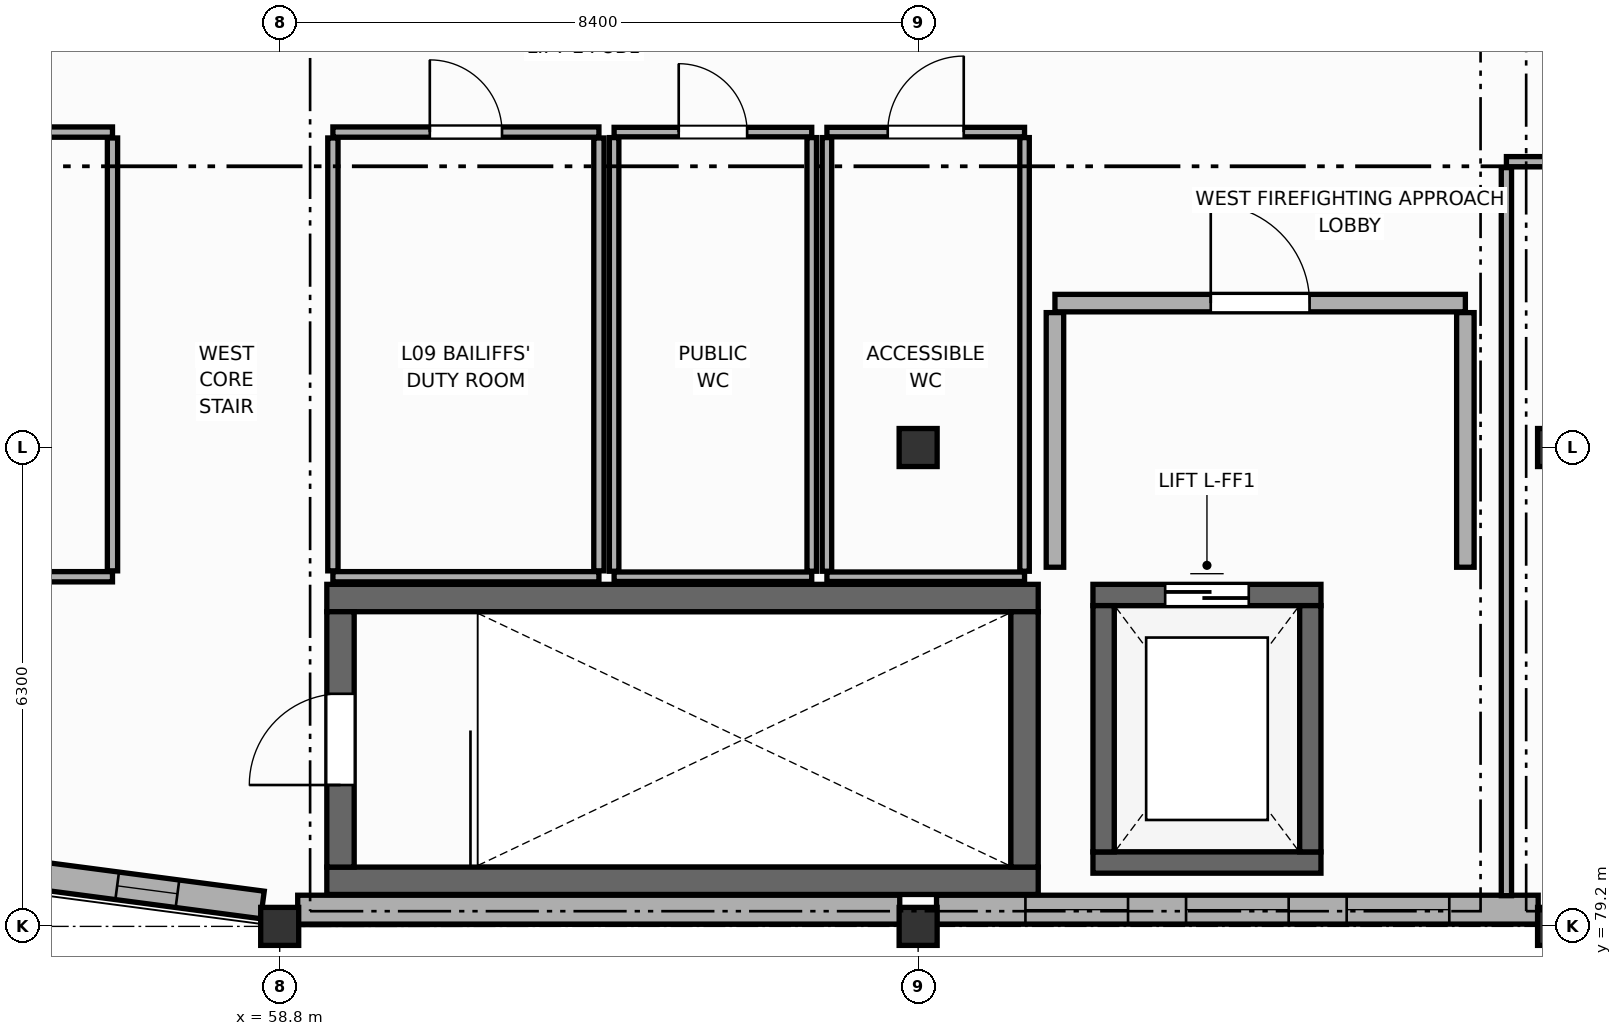
"""IFC4 building model, lengths in metres.
Left out: names, types, materials, properties, quantities, classifications, styles, units other than length and angle.
Written with IfcOpenShell. Run it as: python <this file> out.ifc"""

import sys

from ifc_helpers import new_model, si_unit, direction, frame, frame_2d, origin, origin_2d, place, context, subcontext, project, spatial, rectangle, extrude, element, fill, save


model = new_model("IFC4")
c1 = context("Model", 3, precision=1e-05, world=origin(), true_north=direction((0.0, 1.0)))
c2 = subcontext(c1, "Body", "Model", "MODEL_VIEW")
j1 = project(units=[si_unit("LENGTHUNIT", "METRE"), si_unit("PLANEANGLEUNIT", "RADIAN")], contexts=[c1])
p1 = place(None, origin())
s1 = spatial("IfcSite", under=j1, at=p1, CompositionType="ELEMENT")
p2 = place(p1, origin())
s2 = spatial("IfcBuilding", under=s1, at=p2, CompositionType="ELEMENT")
p3 = place(p2, frame((0.0, 0.0, 35.4)))
s3 = spatial("IfcBuildingStorey", under=s2, at=p3, CompositionType="ELEMENT", Elevation=35.4)
for number, where, z_axis, x_axis in (
    (1, (58.8, 79.2, 0.0), (0.0, 0.0, 1.0), (1.0, 0.0, 0.0)),
    (2, (67.2, 79.2, 0.0), (0.0, 0.0, 1.0), (1.0, 0.0, 0.0)),
    (3, (67.2, 85.5, 0.0), (0.0, 0.0, 1.0), (1.0, 0.0, 0.0)),
    (4, (75.6, 79.2, 0.0), (0.0, 0.0, 1.0), (1.0, 0.0, 0.0)),
    (5, (75.6, 85.5, 0.0), (0.0, 0.0, 1.0), (1.0, 0.0, 0.0)),
):
    element("IfcColumn", number, at=place(p3, frame(where, z_axis=z_axis, x_axis=x_axis)), inside=s3, PredefinedType="COLUMN", context=c2, shape_type="SweptSolid", body=[
        extrude(rectangle(XDim=0.5, YDim=0.5, at=origin_2d()), origin(), (0.0, 0.0, 1.0), 4.2),
    ])
p4 = place(p3, frame((66.958, 79.42, 0.0), z_axis=(0.0, 0.0, 1.0), x_axis=(-1.0, 0.0, 0.0)))
e6 = element("IfcWall", 6, at=p4, inside=s3, PredefinedType="STANDARD", context=c2, shape_type="SweptSolid", body=[
    extrude(rectangle(XDim=7.921, YDim=0.38, at=frame_2d((3.96, 0.0))), origin(), (0.0, 0.0, 1.0), 3.095),
])
p5 = place(p3, frame((75.358, 79.42, 0.0), z_axis=(0.0, 0.0, 1.0), x_axis=(-1.0, 0.0, 0.0)))
e7 = element("IfcWall", 7, at=p5, inside=s3, PredefinedType="STANDARD", context=c2, shape_type="SweptSolid", body=[
    extrude(rectangle(XDim=7.916, YDim=0.38, at=frame_2d((3.958, 0.0))), origin(), (0.0, 0.0, 1.0), 3.495),
])
p6 = place(p5, frame((1.17, 0.0, 0.85)))
e8 = element("IfcOpeningElement", 8, at=p6, cuts=e7, PredefinedType="OPENING", context=c2, shape_type="SweptSolid", body=[
    extrude(rectangle(XDim=1.35, YDim=1.95, at=frame_2d((0.675, 0.975))), frame((0.0, 0.2, 0.0), z_axis=(0.0, -1.0, 0.0), x_axis=(1.0, 0.0, 0.0)), (0.0, 0.0, 1.0), 0.4),
])
p7 = place(p5, frame((3.283, 0.0, 0.85)))
e9 = element("IfcOpeningElement", 9, at=p7, cuts=e7, PredefinedType="OPENING", context=c2, shape_type="SweptSolid", body=[
    extrude(rectangle(XDim=1.35, YDim=1.95, at=frame_2d((0.675, 0.975))), frame((0.0, 0.2, 0.0), z_axis=(0.0, -1.0, 0.0), x_axis=(1.0, 0.0, 0.0)), (0.0, 0.0, 1.0), 0.4),
])
p8 = place(p5, frame((5.396, 0.0, 0.85)))
e10 = element("IfcOpeningElement", 10, at=p8, cuts=e7, PredefinedType="OPENING", context=c2, shape_type="SweptSolid", body=[
    extrude(rectangle(XDim=1.35, YDim=1.95, at=frame_2d((0.675, 0.975))), frame((0.0, 0.2, 0.0), z_axis=(0.0, -1.0, 0.0), x_axis=(1.0, 0.0, 0.0)), (0.0, 0.0, 1.0), 0.4),
])
p9 = place(p3, frame((55.572, 79.877, 0.0), z_axis=(0.0, 0.0, 1.0), x_axis=(0.991438641413, -0.130573428817, 0.0)))
e11 = element("IfcWall", 11, at=p9, inside=s3, PredefinedType="ELEMENTEDWALL", context=c2, shape_type="SweptSolid", body=[
    extrude(rectangle(XDim=3.027, YDim=0.365, at=frame_2d((1.514, 0.0))), origin(), (0.0, 0.0, 1.0), 3.095),
])
p10 = place(p9, frame((1.1, 0.0, 0.85)))
e12 = element("IfcOpeningElement", 12, at=p10, cuts=e11, PredefinedType="OPENING", context=c2, shape_type="SweptSolid", body=[
    extrude(rectangle(XDim=0.8, YDim=1.7, at=frame_2d((0.4, 0.85))), frame((0.0, 0.192, 0.0), z_axis=(0.0, -1.0, 0.0), x_axis=(1.0, 0.0, 0.0)), (0.0, 0.0, 1.0), 0.385),
])
p11 = place(p3, frame((102.0, 79.35, 4.2), z_axis=(0.0, 0.0, 1.0), x_axis=(-1.0, 0.0, 0.0)))
e13 = element("IfcWall", 13, at=p11, inside=s3, PredefinedType="PARAPET", context=c2, shape_type="SweptSolid", body=[
    extrude(rectangle(XDim=43.2, YDim=0.245, at=frame_2d((21.6, 0.0))), origin(), (0.0, 0.0, 1.0), 1.15),
])
p12 = place(p3, frame((58.8, 79.7, 4.2), z_axis=(0.0, 0.0, 1.0), x_axis=(0.0, 1.0, 0.0)))
e14 = element("IfcWall", 14, at=p12, inside=s3, PredefinedType="PARAPET", context=c2, shape_type="SweptSolid", body=[
    extrude(rectangle(XDim=24.2, YDim=0.245, at=frame_2d((12.1, 0.0))), origin(), (0.0, 0.0, 1.0), 1.15),
])
for number, where, z_axis, x_axis in (
    (15, (59.42, 83.52, 0.0), (0.0, 0.0, 1.0), (1.0, 0.0, 0.0)),
    (16, (68.78, 79.8, 0.0), (0.0, 0.0, 1.0), (-1.0, 0.0, 0.0)),
):
    element("IfcWall", number, at=place(p3, frame(where, z_axis=z_axis, x_axis=x_axis)), inside=s3, PredefinedType="SHEAR", context=c2, shape_type="SweptSolid", body=[
        extrude(rectangle(XDim=9.36, YDim=0.36, at=frame_2d((4.68, 0.0))), origin(), (0.0, 0.0, 1.0), 3.98),
    ])
p13 = place(p3, frame((59.6, 79.98, 0.0), z_axis=(0.0, 0.0, 1.0), x_axis=(0.0, 1.0, 0.0)))
e17 = element("IfcWall", 17, at=p13, inside=s3, PredefinedType="SHEAR", context=c2, shape_type="SweptSolid", body=[
    extrude(rectangle(XDim=3.36, YDim=0.36, at=frame_2d((1.68, 0.0))), origin(), (0.0, 0.0, 1.0), 3.98),
])
p14 = place(p13, frame((1.08, 0.0, 0.0)))
e18 = element("IfcOpeningElement", 18, at=p14, cuts=e17, PredefinedType="OPENING", context=c2, shape_type="SweptSolid", body=[
    extrude(rectangle(XDim=1.2, YDim=2.2, at=frame_2d((0.6, 1.1))), frame((0.0, 0.19, 0.0), z_axis=(0.0, -1.0, 0.0), x_axis=(1.0, 0.0, 0.0)), (0.0, 0.0, 1.0), 0.38),
])
p15 = place(p3, frame((68.6, 83.34, 0.0), z_axis=(0.0, 0.0, 1.0), x_axis=(0.0, -1.0, 0.0)))
e19 = element("IfcWall", 19, at=p15, inside=s3, PredefinedType="SHEAR", context=c2, shape_type="SweptSolid", body=[
    extrude(rectangle(XDim=3.36, YDim=0.36, at=frame_2d((1.68, 0.0))), origin(), (0.0, 0.0, 1.0), 3.98),
])
p16 = place(p3, frame((69.5, 83.56, 0.0), z_axis=(0.0, 0.0, 1.0), x_axis=(1.0, 0.0, 0.0)))
e20 = element("IfcWall", 20, at=p16, inside=s3, PredefinedType="SHEAR", context=c2, shape_type="SweptSolid", body=[
    extrude(rectangle(XDim=3.0, YDim=0.28, at=frame_2d((1.5, 0.0))), origin(), (0.0, 0.0, 1.0), 3.98),
])
p17 = place(p16, frame((0.95, 0.0, 0.0)))
e21 = element("IfcOpeningElement", 21, at=p17, cuts=e20, PredefinedType="OPENING", context=c2, shape_type="SweptSolid", body=[
    extrude(rectangle(XDim=1.1, YDim=2.2, at=frame_2d((0.55, 1.1))), frame((0.0, 0.15, 0.0), z_axis=(0.0, -1.0, 0.0), x_axis=(1.0, 0.0, 0.0)), (0.0, 0.0, 1.0), 0.3),
])
p18 = place(p3, frame((72.5, 80.04, 0.0), z_axis=(0.0, 0.0, 1.0), x_axis=(-1.0, 0.0, 0.0)))
e22 = element("IfcWall", 22, at=p18, inside=s3, PredefinedType="SHEAR", context=c2, shape_type="SweptSolid", body=[
    extrude(rectangle(XDim=3.0, YDim=0.28, at=frame_2d((1.5, 0.0))), origin(), (0.0, 0.0, 1.0), 3.98),
])
for number, where, z_axis, x_axis in (
    (23, (69.64, 80.18, 0.0), (0.0, 0.0, 1.0), (0.0, 1.0, 0.0)),
    (24, (72.36, 83.42, 0.0), (0.0, 0.0, 1.0), (0.0, -1.0, 0.0)),
):
    element("IfcWall", number, at=place(p3, frame(where, z_axis=z_axis, x_axis=x_axis)), inside=s3, PredefinedType="SHEAR", context=c2, shape_type="SweptSolid", body=[
        extrude(rectangle(XDim=3.24, YDim=0.28, at=frame_2d((1.62, 0.0))), origin(), (0.0, 0.0, 1.0), 3.98),
    ])
p19 = place(p3, frame((69.0, 87.4, 0.0), z_axis=(0.0, 0.0, 1.0), x_axis=(1.0, 0.0, 0.0)))
e25 = element("IfcWall", 25, at=p19, inside=s3, PredefinedType="STANDARD", context=c2, shape_type="SweptSolid", body=[
    extrude(rectangle(XDim=5.4, YDim=0.23, at=frame_2d((2.7, 0.0))), origin(), (0.0, 0.0, 1.0), 3.95),
])
p20 = place(p19, frame((2.05, 0.0, 0.0)))
e26 = element("IfcOpeningElement", 26, at=p20, cuts=e25, PredefinedType="OPENING", context=c2, shape_type="SweptSolid", body=[
    extrude(rectangle(XDim=1.3, YDim=2.2, at=frame_2d((0.65, 1.1))), frame((0.0, 0.125, 0.0), z_axis=(0.0, -1.0, 0.0), x_axis=(1.0, 0.0, 0.0)), (0.0, 0.0, 1.0), 0.25),
])
for number, where, z_axis, x_axis in (
    (27, (69.0, 83.925, 0.0), (0.0, 0.0, 1.0), (0.0, 1.0, 0.0)),
    (28, (74.4, 87.275, 0.0), (0.0, 0.0, 1.0), (0.0, -1.0, 0.0)),
):
    element("IfcWall", number, at=place(p3, frame(where, z_axis=z_axis, x_axis=x_axis)), inside=s3, PredefinedType="STANDARD", context=c2, shape_type="SweptSolid", body=[
        extrude(rectangle(XDim=3.35, YDim=0.23, at=frame_2d((1.675, 0.0))), origin(), (0.0, 0.0, 1.0), 3.395),
    ])
p21 = place(p3, frame((63.2, 89.65, 0.0), z_axis=(0.0, 0.0, 1.0), x_axis=(1.0, 0.0, 0.0)))
e29 = element("IfcWall", 29, at=p21, inside=s3, PredefinedType="PARTITIONING", context=c2, shape_type="SweptSolid", body=[
    extrude(rectangle(XDim=2.6, YDim=0.125, at=frame_2d((1.3, 0.0))), origin(), (0.0, 0.0, 1.0), 3.95),
])
p22 = place(p21, frame((0.85, 0.0, 0.0)))
e30 = element("IfcOpeningElement", 30, at=p22, cuts=e29, PredefinedType="OPENING", context=c2, shape_type="SweptSolid", body=[
    extrude(rectangle(XDim=0.9, YDim=2.1, at=frame_2d((0.45, 1.05))), frame((0.0, 0.073, 0.0), z_axis=(0.0, -1.0, 0.0), x_axis=(1.0, 0.0, 0.0)), (0.0, 0.0, 1.0), 0.145),
])
p23 = place(p3, frame((65.8, 83.8, 0.0), z_axis=(0.0, 0.0, 1.0), x_axis=(-1.0, 0.0, 0.0)))
e31 = element("IfcWall", 31, at=p23, inside=s3, PredefinedType="PARTITIONING", context=c2, shape_type="SweptSolid", body=[
    extrude(rectangle(XDim=2.6, YDim=0.125, at=frame_2d((1.3, 0.0))), origin(), (0.0, 0.0, 1.0), 3.95),
])
for number, where, z_axis, x_axis in (
    (32, (63.2, 83.873, 0.0), (0.0, 0.0, 1.0), (0.0, 1.0, 0.0)),
    (33, (65.8, 89.577, 0.0), (0.0, 0.0, 1.0), (0.0, -1.0, 0.0)),
):
    element("IfcWall", number, at=place(p3, frame(where, z_axis=z_axis, x_axis=x_axis)), inside=s3, PredefinedType="PARTITIONING", context=c2, shape_type="SweptSolid", body=[
        extrude(rectangle(XDim=5.705, YDim=0.125, at=frame_2d((2.853, 0.0))), origin(), (0.0, 0.0, 1.0), 3.95),
    ])
p24 = place(p3, frame((66.0, 89.65, 0.0), z_axis=(0.0, 0.0, 1.0), x_axis=(1.0, 0.0, 0.0)))
e34 = element("IfcWall", 34, at=p24, inside=s3, PredefinedType="PARTITIONING", context=c2, shape_type="SweptSolid", body=[
    extrude(rectangle(XDim=2.6, YDim=0.125, at=frame_2d((1.3, 0.0))), origin(), (0.0, 0.0, 1.0), 3.495),
])
p25 = place(p24, frame((0.8, 0.0, 0.0)))
e35 = element("IfcOpeningElement", 35, at=p25, cuts=e34, PredefinedType="OPENING", context=c2, shape_type="SweptSolid", body=[
    extrude(rectangle(XDim=1.0, YDim=2.1, at=frame_2d((0.5, 1.05))), frame((0.0, 0.073, 0.0), z_axis=(0.0, -1.0, 0.0), x_axis=(1.0, 0.0, 0.0)), (0.0, 0.0, 1.0), 0.145),
])
p26 = place(p3, frame((68.6, 83.8, 0.0), z_axis=(0.0, 0.0, 1.0), x_axis=(-1.0, 0.0, 0.0)))
e36 = element("IfcWall", 36, at=p26, inside=s3, PredefinedType="PARTITIONING", context=c2, shape_type="SweptSolid", body=[
    extrude(rectangle(XDim=2.6, YDim=0.125, at=frame_2d((1.3, 0.0))), origin(), (0.0, 0.0, 1.0), 3.495),
])
p27 = place(p3, frame((66.0, 83.873, 0.0), z_axis=(0.0, 0.0, 1.0), x_axis=(0.0, 1.0, 0.0)))
e37 = element("IfcWall", 37, at=p27, inside=s3, PredefinedType="PARTITIONING", context=c2, shape_type="SweptSolid", body=[
    extrude(rectangle(XDim=5.705, YDim=0.125, at=frame_2d((2.853, 0.0))), origin(), (0.0, 0.0, 1.0), 3.95),
])
p28 = place(p3, frame((68.6, 89.577, 0.0), z_axis=(0.0, 0.0, 1.0), x_axis=(0.0, -1.0, 0.0)))
e38 = element("IfcWall", 38, at=p28, inside=s3, PredefinedType="PARTITIONING", context=c2, shape_type="SweptSolid", body=[
    extrude(rectangle(XDim=5.705, YDim=0.125, at=frame_2d((2.853, 0.0))), origin(), (0.0, 0.0, 1.0), 3.395),
])
p29 = place(p3, frame((59.5, 89.65, 0.0), z_axis=(0.0, 0.0, 1.0), x_axis=(1.0, 0.0, 0.0)))
e39 = element("IfcWall", 39, at=p29, inside=s3, PredefinedType="PARTITIONING", context=c2, shape_type="SweptSolid", body=[
    extrude(rectangle(XDim=3.5, YDim=0.135, at=frame_2d((1.75, 0.0))), origin(), (0.0, 0.0, 1.0), 3.95),
])
p30 = place(p29, frame((1.275, 0.0, 0.0)))
e40 = element("IfcOpeningElement", 40, at=p30, cuts=e39, PredefinedType="OPENING", context=c2, shape_type="SweptSolid", body=[
    extrude(rectangle(XDim=0.95, YDim=2.15, at=frame_2d((0.475, 1.075))), frame((0.0, 0.077, 0.0), z_axis=(0.0, -1.0, 0.0), x_axis=(1.0, 0.0, 0.0)), (0.0, 0.0, 1.0), 0.155),
])
p31 = place(p3, frame((63.0, 83.8, 0.0), z_axis=(0.0, 0.0, 1.0), x_axis=(-1.0, 0.0, 0.0)))
e41 = element("IfcWall", 41, at=p31, inside=s3, PredefinedType="PARTITIONING", context=c2, shape_type="SweptSolid", body=[
    extrude(rectangle(XDim=3.5, YDim=0.135, at=frame_2d((1.75, 0.0))), origin(), (0.0, 0.0, 1.0), 3.95),
])
for number, where, z_axis, x_axis in (
    (42, (59.5, 83.877, 0.0), (0.0, 0.0, 1.0), (0.0, 1.0, 0.0)),
    (43, (63.0, 89.573, 0.0), (0.0, 0.0, 1.0), (0.0, -1.0, 0.0)),
):
    element("IfcWall", number, at=place(p3, frame(where, z_axis=z_axis, x_axis=x_axis)), inside=s3, PredefinedType="PARTITIONING", context=c2, shape_type="SweptSolid", body=[
        extrude(rectangle(XDim=5.695, YDim=0.135, at=frame_2d((2.848, 0.0))), origin(), (0.0, 0.0, 1.0), 3.95),
    ])
p32 = place(p3, frame((74.94, 89.26, 0.0), z_axis=(0.0, 0.0, 1.0), x_axis=(1.0, 0.0, 0.0)))
e44 = element("IfcWall", 44, at=p32, inside=s3, PredefinedType="PARTITIONING", context=c2, shape_type="SweptSolid", body=[
    extrude(rectangle(XDim=3.914, YDim=0.135, at=frame_2d((1.957, 0.0))), origin(), (0.0, 0.0, 1.0), 3.495),
])
p33 = place(p32, frame((1.482, 0.0, 0.0)))
e45 = element("IfcOpeningElement", 45, at=p33, cuts=e44, PredefinedType="OPENING", context=c2, shape_type="SweptSolid", body=[
    extrude(rectangle(XDim=0.95, YDim=2.15, at=frame_2d((0.475, 1.075))), frame((0.0, 0.077, 0.0), z_axis=(0.0, -1.0, 0.0), x_axis=(1.0, 0.0, 0.0)), (0.0, 0.0, 1.0), 0.155),
])
p34 = place(p3, frame((74.94, 79.604, 0.0), z_axis=(0.0, 0.0, 1.0), x_axis=(0.0, 1.0, 0.0)))
e46 = element("IfcWall", 46, at=p34, inside=s3, PredefinedType="PARTITIONING", context=c2, shape_type="SweptSolid", body=[
    extrude(rectangle(XDim=9.579, YDim=0.135, at=frame_2d((4.789, 0.0))), origin(), (0.0, 0.0, 1.0), 3.395),
])
p35 = place(p3, frame((49.3, 89.65, 0.0), z_axis=(0.0, 0.0, 1.0), x_axis=(1.0, 0.0, 0.0)))
e47 = element("IfcWall", 47, at=p35, inside=s3, PredefinedType="PARTITIONING", context=c2, shape_type="SweptSolid", body=[
    extrude(rectangle(XDim=7.3, YDim=0.135, at=frame_2d((3.65, 0.0))), origin(), (0.0, 0.0, 1.0), 2.995),
])
p36 = place(p35, frame((1.187, 0.0, 0.0)))
e48 = element("IfcOpeningElement", 48, at=p36, cuts=e47, PredefinedType="OPENING", context=c2, shape_type="SweptSolid", body=[
    extrude(rectangle(XDim=1.02, YDim=2.15, at=frame_2d((0.51, 1.075))), frame((0.0, 0.077, 0.0), z_axis=(0.0, -1.0, 0.0), x_axis=(1.0, 0.0, 0.0)), (0.0, 0.0, 1.0), 0.155),
])
p37 = place(p3, frame((56.6, 83.8, 0.0), z_axis=(0.0, 0.0, 1.0), x_axis=(-1.0, 0.0, 0.0)))
e49 = element("IfcWall", 49, at=p37, inside=s3, PredefinedType="PARTITIONING", context=c2, shape_type="SweptSolid", body=[
    extrude(rectangle(XDim=7.3, YDim=0.135, at=frame_2d((3.65, 0.0))), origin(), (0.0, 0.0, 1.0), 2.995),
])
p38 = place(p3, frame((56.6, 89.573, 0.0), z_axis=(0.0, 0.0, 1.0), x_axis=(0.0, -1.0, 0.0)))
e50 = element("IfcWall", 50, at=p38, inside=s3, PredefinedType="PARTITIONING", context=c2, shape_type="SweptSolid", body=[
    extrude(rectangle(XDim=5.695, YDim=0.135, at=frame_2d((2.848, 0.0))), origin(), (0.0, 0.0, 1.0), 3.95),
])
p39 = place(p6, origin())
e51 = element("IfcWindow", 51, at=p39, inside=s3, PartitioningType="SINGLE_PANEL", PredefinedType="WINDOW", context=c2, shape_type="SweptSolid", body=[
    extrude(rectangle(XDim=1.35, YDim=1.95, at=frame_2d((0.675, 0.975))), frame((0.0, 0.03, 0.0), z_axis=(0.0, -1.0, 0.0), x_axis=(1.0, 0.0, 0.0)), (0.0, 0.0, 1.0), 0.06),
])
fill(e8, e51)
p40 = place(p7, origin())
e52 = element("IfcWindow", 52, at=p40, inside=s3, PartitioningType="SINGLE_PANEL", PredefinedType="WINDOW", context=c2, shape_type="SweptSolid", body=[
    extrude(rectangle(XDim=1.35, YDim=1.95, at=frame_2d((0.675, 0.975))), frame((0.0, 0.03, 0.0), z_axis=(0.0, -1.0, 0.0), x_axis=(1.0, 0.0, 0.0)), (0.0, 0.0, 1.0), 0.06),
])
fill(e9, e52)
p41 = place(p8, origin())
e53 = element("IfcWindow", 53, at=p41, inside=s3, PartitioningType="SINGLE_PANEL", PredefinedType="WINDOW", context=c2, shape_type="SweptSolid", body=[
    extrude(rectangle(XDim=1.35, YDim=1.95, at=frame_2d((0.675, 0.975))), frame((0.0, 0.03, 0.0), z_axis=(0.0, -1.0, 0.0), x_axis=(1.0, 0.0, 0.0)), (0.0, 0.0, 1.0), 0.06),
])
fill(e10, e53)
p42 = place(p10, origin())
e54 = element("IfcWindow", 54, at=p42, inside=s3, PartitioningType="SINGLE_PANEL", PredefinedType="WINDOW", context=c2, shape_type="SweptSolid", body=[
    extrude(rectangle(XDim=0.8, YDim=1.7, at=frame_2d((0.4, 0.85))), frame((0.0, 0.03, 0.0), z_axis=(0.0, -1.0, 0.0), x_axis=(1.0, 0.0, 0.0)), (0.0, 0.0, 1.0), 0.06),
])
fill(e12, e54)
p43 = place(p14, origin())
e55 = element("IfcDoor", 55, at=p43, inside=s3, OperationType="SINGLE_SWING_LEFT", PredefinedType="DOOR", context=c2, shape_type="SweptSolid", body=[
    extrude(rectangle(XDim=1.2, YDim=2.2, at=frame_2d((0.6, 1.1))), frame((0.0, 0.025, 0.0), z_axis=(0.0, -1.0, 0.0), x_axis=(1.0, 0.0, 0.0)), (0.0, 0.0, 1.0), 0.05),
])
fill(e18, e55)
p44 = place(p17, origin())
e56 = element("IfcDoor", 56, at=p44, inside=s3, OperationType="DOUBLE_DOOR_SLIDING", PredefinedType="DOOR", context=c2, shape_type="SweptSolid", body=[
    extrude(rectangle(XDim=1.1, YDim=2.2, at=frame_2d((0.55, 1.1))), frame((0.0, 0.025, 0.0), z_axis=(0.0, -1.0, 0.0), x_axis=(1.0, 0.0, 0.0)), (0.0, 0.0, 1.0), 0.05),
])
fill(e21, e56)
p45 = place(p20, origin())
e57 = element("IfcDoor", 57, at=p45, inside=s3, OperationType="SINGLE_SWING_LEFT", PredefinedType="DOOR", context=c2, shape_type="SweptSolid", body=[
    extrude(rectangle(XDim=1.3, YDim=2.2, at=frame_2d((0.65, 1.1))), frame((0.0, 0.025, 0.0), z_axis=(0.0, -1.0, 0.0), x_axis=(1.0, 0.0, 0.0)), (0.0, 0.0, 1.0), 0.05),
])
fill(e26, e57)
p46 = place(p22, origin())
e58 = element("IfcDoor", 58, at=p46, inside=s3, OperationType="SINGLE_SWING_LEFT", PredefinedType="DOOR", context=c2, shape_type="SweptSolid", body=[
    extrude(rectangle(XDim=0.9, YDim=2.1, at=frame_2d((0.45, 1.05))), frame((0.0, 0.025, 0.0), z_axis=(0.0, -1.0, 0.0), x_axis=(1.0, 0.0, 0.0)), (0.0, 0.0, 1.0), 0.05),
])
fill(e30, e58)
p47 = place(p25, origin())
e59 = element("IfcDoor", 59, at=p47, inside=s3, OperationType="SINGLE_SWING_RIGHT", PredefinedType="DOOR", context=c2, shape_type="SweptSolid", body=[
    extrude(rectangle(XDim=1.0, YDim=2.1, at=frame_2d((0.5, 1.05))), frame((0.0, 0.025, 0.0), z_axis=(0.0, -1.0, 0.0), x_axis=(1.0, 0.0, 0.0)), (0.0, 0.0, 1.0), 0.05),
])
fill(e35, e59)
p48 = place(p30, origin())
e60 = element("IfcDoor", 60, at=p48, inside=s3, OperationType="SINGLE_SWING_LEFT", PredefinedType="DOOR", context=c2, shape_type="SweptSolid", body=[
    extrude(rectangle(XDim=0.95, YDim=2.15, at=frame_2d((0.475, 1.075))), frame((0.0, 0.025, 0.0), z_axis=(0.0, -1.0, 0.0), x_axis=(1.0, 0.0, 0.0)), (0.0, 0.0, 1.0), 0.05),
])
fill(e40, e60)
save(model, sys.argv[1])
